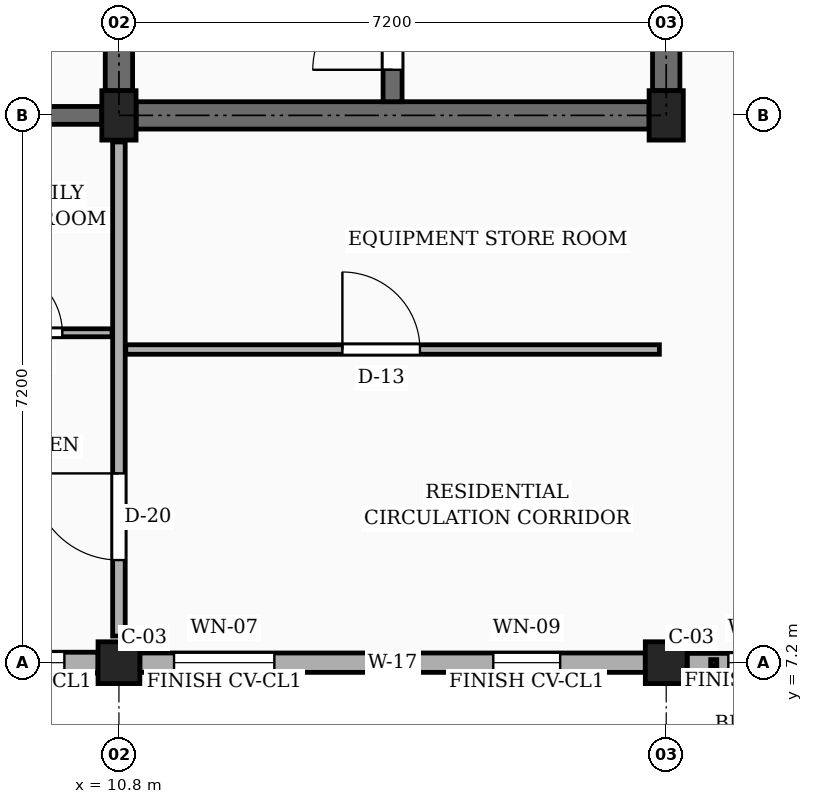
"""IFC4 building model, lengths in metres.
Left out: names, types, materials, properties, quantities, classifications, styles, units other than length and angle.
Written with IfcOpenShell. Run it as: python <this file> out.ifc"""

import sys

from ifc_helpers import new_model, si_unit, direction, frame, frame_2d, origin, origin_2d, place, context, subcontext, project, spatial, rectangle, extrude, element, fill, save


model = new_model("IFC4")
c1 = context("Model", 3, precision=1e-05, world=origin(), true_north=direction((0.0, 1.0)))
c2 = subcontext(c1, "Body", "Model", "MODEL_VIEW")
j1 = project(units=[si_unit("LENGTHUNIT", "METRE"), si_unit("PLANEANGLEUNIT", "RADIAN")], contexts=[c1])
p1 = place(None, origin())
s1 = spatial("IfcSite", under=j1, at=p1, CompositionType="ELEMENT")
p2 = place(p1, origin())
s2 = spatial("IfcBuilding", under=s1, at=p2, CompositionType="ELEMENT")
p3 = place(p2, frame((0.0, 0.0, 13.95)))
s3 = spatial("IfcBuildingStorey", under=s2, at=p3, CompositionType="ELEMENT", Elevation=13.95)
p4 = place(p3, frame((10.8, 7.2, 0.0), z_axis=(0.0, 0.0, 1.0), x_axis=(1.0, 0.0, 0.0)))
e1 = element("IfcColumn", 1, at=p4, inside=s3, PredefinedType="COLUMN", context=c2, shape_type="SweptSolid", body=[
    extrude(rectangle(XDim=0.55, YDim=0.55, at=origin_2d()), origin(), (0.0, 0.0, 1.0), 3.15),
])
p5 = place(p3, frame((10.8, 14.4, 0.0), z_axis=(0.0, 0.0, 1.0), x_axis=(1.0, 0.0, 0.0)))
e2 = element("IfcColumn", 2, at=p5, inside=s3, PredefinedType="COLUMN", context=c2, shape_type="SweptSolid", body=[
    extrude(rectangle(XDim=0.45, YDim=0.65, at=origin_2d()), origin(), (0.0, 0.0, 1.0), 3.15),
])
p6 = place(p3, frame((18.0, 7.2, 0.0), z_axis=(0.0, 0.0, 1.0), x_axis=(1.0, 0.0, 0.0)))
e3 = element("IfcColumn", 3, at=p6, inside=s3, PredefinedType="COLUMN", context=c2, shape_type="SweptSolid", body=[
    extrude(rectangle(XDim=0.55, YDim=0.55, at=origin_2d()), origin(), (0.0, 0.0, 1.0), 3.15),
])
p7 = place(p3, frame((18.0, 14.4, 0.0), z_axis=(0.0, 0.0, 1.0), x_axis=(1.0, 0.0, 0.0)))
e4 = element("IfcColumn", 4, at=p7, inside=s3, PredefinedType="COLUMN", context=c2, shape_type="SweptSolid", body=[
    extrude(rectangle(XDim=0.45, YDim=0.65, at=origin_2d()), origin(), (0.0, 0.0, 1.0), 3.15),
])
p8 = place(p3, frame((3.875, 14.4, 0.0), z_axis=(0.0, 0.0, 1.0), x_axis=(1.0, 0.0, 0.0)))
e5 = element("IfcWall", 5, at=p8, inside=s3, PredefinedType="SOLIDWALL", context=c2, shape_type="SweptSolid", body=[
    extrude(rectangle(XDim=6.7, YDim=0.235, at=frame_2d((3.35, 0.0))), origin(), (0.0, 0.0, 1.0), 2.17),
])
p9 = place(p8, frame((1.35, 0.0, 0.0)))
e6 = element("IfcOpeningElement", 6, at=p9, cuts=e5, PredefinedType="OPENING", context=c2, shape_type="SweptSolid", body=[
    extrude(rectangle(XDim=0.98, YDim=2.12, at=frame_2d((0.49, 1.06))), frame((0.0, 0.127, 0.0), z_axis=(0.0, -1.0, 0.0), x_axis=(1.0, 0.0, 0.0)), (0.0, 0.0, 1.0), 0.255),
])
p10 = place(p3, frame((3.875, 7.2, 0.0), z_axis=(0.0, 0.0, 1.0), x_axis=(1.0, 0.0, 0.0)))
e7 = element("IfcWall", 7, at=p10, inside=s3, PredefinedType="SOLIDWALL", context=c2, shape_type="SweptSolid", body=[
    extrude(rectangle(XDim=6.65, YDim=0.275, at=frame_2d((3.325, 0.0))), origin(), (0.0, 0.0, 1.0), 2.44),
])
p11 = place(p10, frame((1.782, 0.0, 0.78)))
e8 = element("IfcOpeningElement", 8, at=p11, cuts=e7, PredefinedType="OPENING", context=c2, shape_type="SweptSolid", body=[
    extrude(rectangle(XDim=1.16, YDim=1.15, at=frame_2d((0.58, 0.575))), frame((0.0, 0.147, 0.0), z_axis=(0.0, -1.0, 0.0), x_axis=(1.0, 0.0, 0.0)), (0.0, 0.0, 1.0), 0.295),
])
p12 = place(p10, frame((4.887, 0.0, 0.78)))
e9 = element("IfcOpeningElement", 9, at=p12, cuts=e7, PredefinedType="OPENING", context=c2, shape_type="SweptSolid", body=[
    extrude(rectangle(XDim=1.32, YDim=1.15, at=frame_2d((0.66, 0.575))), frame((0.0, 0.147, 0.0), z_axis=(0.0, -1.0, 0.0), x_axis=(1.0, 0.0, 0.0)), (0.0, 0.0, 1.0), 0.295),
])
p13 = place(p3, frame((11.075, 7.2, 0.0), z_axis=(0.0, 0.0, 1.0), x_axis=(1.0, 0.0, 0.0)))
e10 = element("IfcWall", 10, at=p13, inside=s3, PredefinedType="SOLIDWALL", context=c2, shape_type="SweptSolid", body=[
    extrude(rectangle(XDim=6.65, YDim=0.255, at=frame_2d((3.325, 0.0))), origin(), (0.0, 0.0, 1.0), 2.44),
])
p14 = place(p13, frame((0.45, 0.0, 0.78)))
e11 = element("IfcOpeningElement", 11, at=p14, cuts=e10, PredefinedType="OPENING", context=c2, shape_type="SweptSolid", body=[
    extrude(rectangle(XDim=1.32, YDim=1.15, at=frame_2d((0.66, 0.575))), frame((0.0, 0.137, 0.0), z_axis=(0.0, -1.0, 0.0), x_axis=(1.0, 0.0, 0.0)), (0.0, 0.0, 1.0), 0.275),
])
p15 = place(p13, frame((4.65, 0.0, 0.78)))
e12 = element("IfcOpeningElement", 12, at=p15, cuts=e10, PredefinedType="OPENING", context=c2, shape_type="SweptSolid", body=[
    extrude(rectangle(XDim=0.88, YDim=1.26, at=frame_2d((0.44, 0.63))), frame((0.0, 0.137, 0.0), z_axis=(0.0, -1.0, 0.0), x_axis=(1.0, 0.0, 0.0)), (0.0, 0.0, 1.0), 0.275),
])
p16 = place(p3, frame((18.275, 7.2, 0.0), z_axis=(0.0, 0.0, 1.0), x_axis=(1.0, 0.0, 0.0)))
e13 = element("IfcWall", 13, at=p16, inside=s3, PredefinedType="SOLIDWALL", context=c2, shape_type="SweptSolid", body=[
    extrude(rectangle(XDim=6.65, YDim=0.245, at=frame_2d((3.325, 0.0))), origin(), (0.0, 0.0, 1.0), 2.44),
])
p17 = place(p16, frame((0.542, 0.0, 0.78)))
e14 = element("IfcOpeningElement", 14, at=p17, cuts=e13, PredefinedType="OPENING", context=c2, shape_type="SweptSolid", body=[
    extrude(rectangle(XDim=0.88, YDim=1.26, at=frame_2d((0.44, 0.63))), frame((0.0, 0.133, 0.0), z_axis=(0.0, -1.0, 0.0), x_axis=(1.0, 0.0, 0.0)), (0.0, 0.0, 1.0), 0.265),
])
p18 = place(p16, frame((2.945, 0.0, 0.78)))
e15 = element("IfcOpeningElement", 15, at=p18, cuts=e13, PredefinedType="OPENING", context=c2, shape_type="SweptSolid", body=[
    extrude(rectangle(XDim=1.04, YDim=1.26, at=frame_2d((0.52, 0.63))), frame((0.0, 0.133, 0.0), z_axis=(0.0, -1.0, 0.0), x_axis=(1.0, 0.0, 0.0)), (0.0, 0.0, 1.0), 0.265),
])
p19 = place(p16, frame((5.383, 0.0, 0.78)))
e16 = element("IfcOpeningElement", 16, at=p19, cuts=e13, PredefinedType="OPENING", context=c2, shape_type="SweptSolid", body=[
    extrude(rectangle(XDim=0.85, YDim=1.15, at=frame_2d((0.425, 0.575))), frame((0.0, 0.133, 0.0), z_axis=(0.0, -1.0, 0.0), x_axis=(1.0, 0.0, 0.0)), (0.0, 0.0, 1.0), 0.265),
])
p20 = place(p3, frame((10.8, 14.725, 0.0), z_axis=(0.0, 0.0, 1.0), x_axis=(0.0, 1.0, 0.0)))
e17 = element("IfcWall", 17, at=p20, inside=s3, PredefinedType="SHEAR", context=c2, shape_type="SweptSolid", body=[
    extrude(rectangle(XDim=6.55, YDim=0.36, at=frame_2d((3.275, 0.0))), origin(), (0.0, 0.0, 1.0), 2.87),
])
p21 = place(p3, frame((18.0, 14.725, 0.0), z_axis=(0.0, 0.0, 1.0), x_axis=(0.0, 1.0, 0.0)))
e18 = element("IfcWall", 18, at=p21, inside=s3, PredefinedType="SHEAR", context=c2, shape_type="SweptSolid", body=[
    extrude(rectangle(XDim=6.55, YDim=0.36, at=frame_2d((3.275, 0.0))), origin(), (0.0, 0.0, 1.0), 2.87),
])
p22 = place(p21, frame((1.5, 0.0, 0.0)))
e19 = element("IfcOpeningElement", 19, at=p22, cuts=e18, PredefinedType="OPENING", context=c2, shape_type="SweptSolid", body=[
    extrude(rectangle(XDim=1.1, YDim=2.15, at=frame_2d((0.55, 1.075))), frame((0.0, 0.19, 0.0), z_axis=(0.0, -1.0, 0.0), x_axis=(1.0, 0.0, 0.0)), (0.0, 0.0, 1.0), 0.38),
])
p23 = place(p3, frame((11.025, 14.4, 0.0), z_axis=(0.0, 0.0, 1.0), x_axis=(1.0, 0.0, 0.0)))
e20 = element("IfcWall", 20, at=p23, inside=s3, PredefinedType="SHEAR", context=c2, shape_type="SweptSolid", body=[
    extrude(rectangle(XDim=6.75, YDim=0.36, at=frame_2d((3.375, 0.0))), origin(), (0.0, 0.0, 1.0), 2.87),
])
p24 = place(p3, frame((14.4, 14.58, 0.0), z_axis=(0.0, 0.0, 1.0), x_axis=(0.0, 1.0, 0.0)))
e21 = element("IfcWall", 21, at=p24, inside=s3, PredefinedType="SHEAR", context=c2, shape_type="SweptSolid", body=[
    extrude(rectangle(XDim=6.84, YDim=0.25, at=frame_2d((3.42, 0.0))), origin(), (0.0, 0.0, 1.0), 2.87),
])
p25 = place(p24, frame((0.42, 0.0, 0.0)))
e22 = element("IfcOpeningElement", 22, at=p25, cuts=e21, PredefinedType="OPENING", context=c2, shape_type="SweptSolid", body=[
    extrude(rectangle(XDim=1.05, YDim=2.15, at=frame_2d((0.525, 1.075))), frame((0.0, 0.135, 0.0), z_axis=(0.0, -1.0, 0.0), x_axis=(1.0, 0.0, 0.0)), (0.0, 0.0, 1.0), 0.27),
])
p26 = place(p3, frame((10.8, 7.55, 0.0), z_axis=(0.0, 0.0, 1.0), x_axis=(0.0, 1.0, 0.0)))
e23 = element("IfcWall", 23, at=p26, inside=s3, PredefinedType="PARTITIONING", context=c2, shape_type="SweptSolid", body=[
    extrude(rectangle(XDim=6.5, YDim=0.165, at=frame_2d((3.25, 0.0))), origin(), (0.0, 0.0, 1.0), 2.305),
])
p27 = place(p26, frame((1.0, 0.0, 0.0)))
e24 = element("IfcOpeningElement", 24, at=p27, cuts=e23, PredefinedType="OPENING", context=c2, shape_type="SweptSolid", body=[
    extrude(rectangle(XDim=1.14, YDim=2.18, at=frame_2d((0.57, 1.09))), frame((0.0, 0.093, 0.0), z_axis=(0.0, -1.0, 0.0), x_axis=(1.0, 0.0, 0.0)), (0.0, 0.0, 1.0), 0.185),
])
p28 = place(p3, frame((10.89, 11.32, 0.0), z_axis=(0.0, 0.0, 1.0), x_axis=(1.0, 0.0, 0.0)))
e25 = element("IfcWall", 25, at=p28, inside=s3, PredefinedType="PARTITIONING", context=c2, shape_type="SweptSolid", body=[
    extrude(rectangle(XDim=7.02, YDim=0.125, at=frame_2d((3.51, 0.0))), origin(), (0.0, 0.0, 1.0), 2.305),
])
p29 = place(p28, frame((2.85, 0.0, 0.0)))
e26 = element("IfcOpeningElement", 26, at=p29, cuts=e25, PredefinedType="OPENING", context=c2, shape_type="SweptSolid", body=[
    extrude(rectangle(XDim=1.02, YDim=2.15, at=frame_2d((0.51, 1.075))), frame((0.0, 0.073, 0.0), z_axis=(0.0, -1.0, 0.0), x_axis=(1.0, 0.0, 0.0)), (0.0, 0.0, 1.0), 0.145),
])
p30 = place(p3, frame((8.53, 11.54, 0.0), z_axis=(0.0, 0.0, 1.0), x_axis=(1.0, 0.0, 0.0)))
e27 = element("IfcWall", 27, at=p30, inside=s3, PredefinedType="PARTITIONING", context=c2, shape_type="SweptSolid", body=[
    extrude(rectangle(XDim=2.18, YDim=0.105, at=frame_2d((1.09, 0.0))), origin(), (0.0, 0.0, 1.0), 2.305),
])
p31 = place(p30, frame((0.655, 0.0, 0.0)))
e28 = element("IfcOpeningElement", 28, at=p31, cuts=e27, PredefinedType="OPENING", context=c2, shape_type="SweptSolid", body=[
    extrude(rectangle(XDim=0.87, YDim=2.05, at=frame_2d((0.435, 1.025))), frame((0.0, 0.062, 0.0), z_axis=(0.0, -1.0, 0.0), x_axis=(1.0, 0.0, 0.0)), (0.0, 0.0, 1.0), 0.125),
])
p32 = place(p12, origin())
e29 = element("IfcWindow", 29, at=p32, inside=s3, PartitioningType="SINGLE_PANEL", PredefinedType="WINDOW", context=c2, shape_type="SweptSolid", body=[
    extrude(rectangle(XDim=1.32, YDim=1.15, at=frame_2d((0.66, 0.575))), frame((0.0, 0.03, 0.0), z_axis=(0.0, -1.0, 0.0), x_axis=(1.0, 0.0, 0.0)), (0.0, 0.0, 1.0), 0.06),
])
fill(e9, e29)
p33 = place(p14, origin())
e30 = element("IfcWindow", 30, at=p33, inside=s3, PartitioningType="SINGLE_PANEL", PredefinedType="WINDOW", context=c2, shape_type="SweptSolid", body=[
    extrude(rectangle(XDim=1.32, YDim=1.15, at=frame_2d((0.66, 0.575))), frame((0.0, 0.03, 0.0), z_axis=(0.0, -1.0, 0.0), x_axis=(1.0, 0.0, 0.0)), (0.0, 0.0, 1.0), 0.06),
])
fill(e11, e30)
p34 = place(p15, origin())
e31 = element("IfcWindow", 31, at=p34, inside=s3, PartitioningType="SINGLE_PANEL", PredefinedType="WINDOW", context=c2, shape_type="SweptSolid", body=[
    extrude(rectangle(XDim=0.88, YDim=1.26, at=frame_2d((0.44, 0.63))), frame((0.0, 0.03, 0.0), z_axis=(0.0, -1.0, 0.0), x_axis=(1.0, 0.0, 0.0)), (0.0, 0.0, 1.0), 0.06),
])
fill(e12, e31)
p35 = place(p17, origin())
e32 = element("IfcWindow", 32, at=p35, inside=s3, PartitioningType="SINGLE_PANEL", PredefinedType="WINDOW", context=c2, shape_type="SweptSolid", body=[
    extrude(rectangle(XDim=0.88, YDim=1.26, at=frame_2d((0.44, 0.63))), frame((0.0, 0.03, 0.0), z_axis=(0.0, -1.0, 0.0), x_axis=(1.0, 0.0, 0.0)), (0.0, 0.0, 1.0), 0.06),
])
fill(e14, e32)
p36 = place(p25, origin())
e33 = element("IfcDoor", 33, at=p36, inside=s3, OperationType="SINGLE_SWING_LEFT", PredefinedType="DOOR", context=c2, shape_type="SweptSolid", body=[
    extrude(rectangle(XDim=1.05, YDim=2.15, at=frame_2d((0.525, 1.075))), frame((0.0, 0.025, 0.0), z_axis=(0.0, -1.0, 0.0), x_axis=(1.0, 0.0, 0.0)), (0.0, 0.0, 1.0), 0.05),
])
fill(e22, e33)
p37 = place(p27, origin())
e34 = element("IfcDoor", 34, at=p37, inside=s3, OperationType="SINGLE_SWING_RIGHT", PredefinedType="DOOR", context=c2, shape_type="SweptSolid", body=[
    extrude(rectangle(XDim=1.14, YDim=2.18, at=frame_2d((0.57, 1.09))), frame((0.0, 0.025, 0.0), z_axis=(0.0, -1.0, 0.0), x_axis=(1.0, 0.0, 0.0)), (0.0, 0.0, 1.0), 0.05),
])
fill(e24, e34)
p38 = place(p29, origin())
e35 = element("IfcDoor", 35, at=p38, inside=s3, OperationType="SINGLE_SWING_LEFT", PredefinedType="DOOR", context=c2, shape_type="SweptSolid", body=[
    extrude(rectangle(XDim=1.02, YDim=2.15, at=frame_2d((0.51, 1.075))), frame((0.0, 0.025, 0.0), z_axis=(0.0, -1.0, 0.0), x_axis=(1.0, 0.0, 0.0)), (0.0, 0.0, 1.0), 0.05),
])
fill(e26, e35)
p39 = place(p31, origin())
e36 = element("IfcDoor", 36, at=p39, inside=s3, OperationType="SINGLE_SWING_LEFT", PredefinedType="DOOR", context=c2, shape_type="SweptSolid", body=[
    extrude(rectangle(XDim=0.87, YDim=2.05, at=frame_2d((0.435, 1.025))), frame((0.0, 0.025, 0.0), z_axis=(0.0, -1.0, 0.0), x_axis=(1.0, 0.0, 0.0)), (0.0, 0.0, 1.0), 0.05),
])
fill(e28, e36)
save(model, sys.argv[1])
